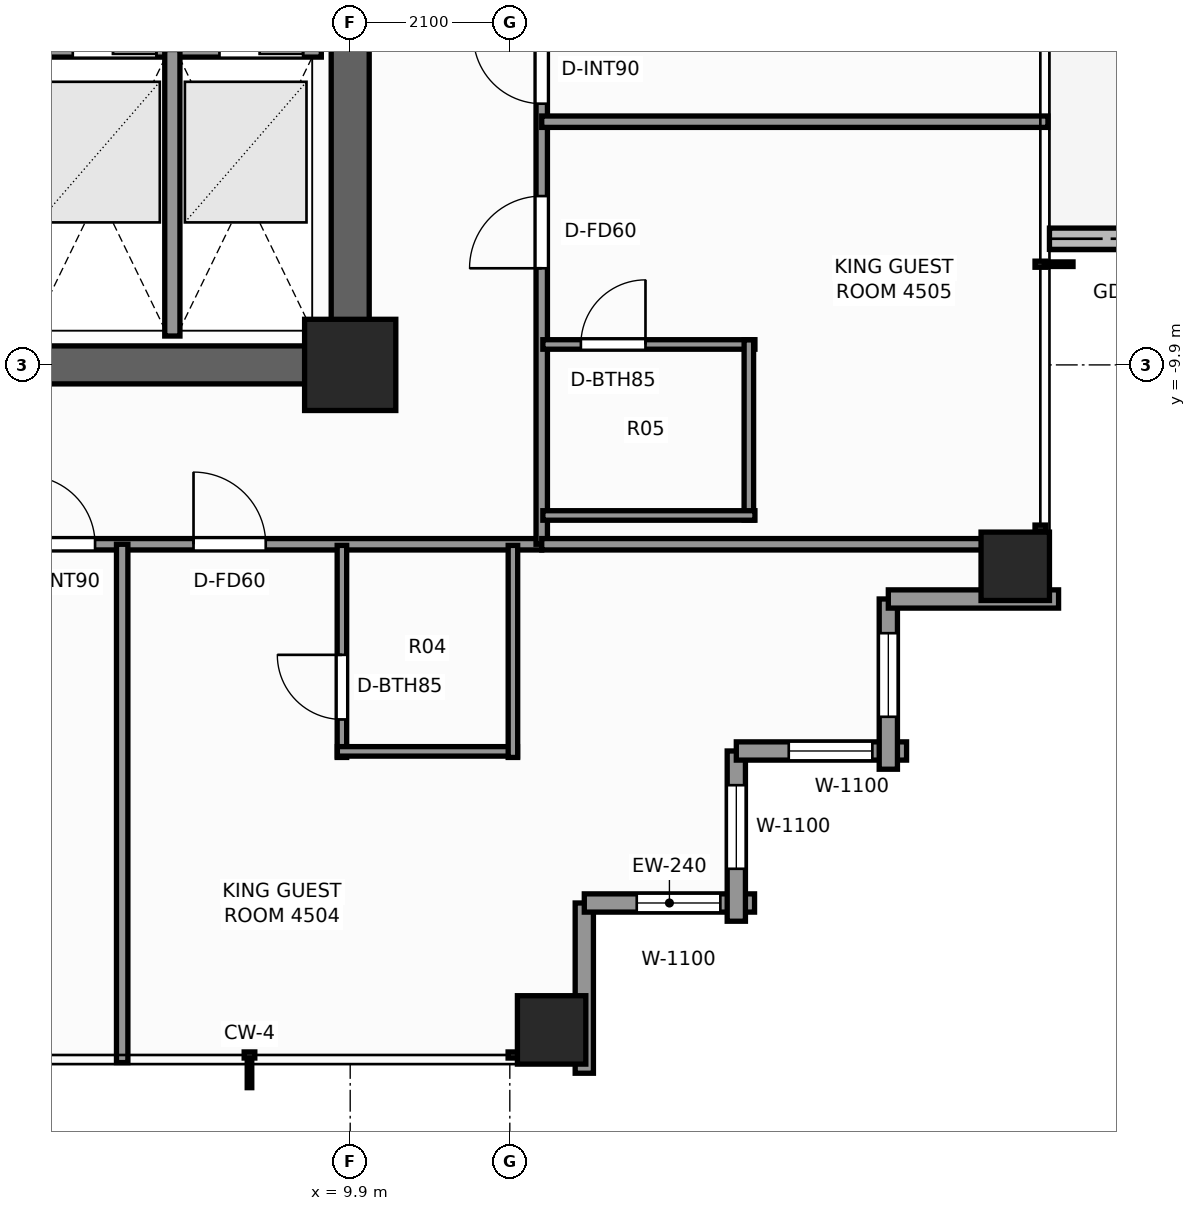
"""IFC4 building model, lengths in metres.
Left out: names, types, materials, properties, quantities, classifications, styles, units other than length and angle.
Written with IfcOpenShell. Run it as: python <this file> out.ifc"""

import sys

from ifc_helpers import new_model, si_unit, direction, frame, frame_2d, origin, origin_2d, place, context, subcontext, project, spatial, rectangle, extrude, element, fill, save


model = new_model("IFC4")
c1 = context("Model", 3, precision=1e-05, world=origin(), true_north=direction((0.0, 1.0)))
c2 = subcontext(c1, "Body", "Model", "MODEL_VIEW")
j1 = project(units=[si_unit("LENGTHUNIT", "METRE"), si_unit("PLANEANGLEUNIT", "RADIAN")], contexts=[c1])
p1 = place(None, origin())
s1 = spatial("IfcSite", under=j1, at=p1, CompositionType="ELEMENT")
p2 = place(p1, origin())
s2 = spatial("IfcBuilding", under=s1, at=p2, CompositionType="ELEMENT")
p3 = place(p2, frame((0.0, 0.0, 156.9)))
s3 = spatial("IfcBuildingStorey", under=s2, at=p3, CompositionType="ELEMENT", Elevation=156.9)
p4 = place(p3, frame((10.15, -9.9, 0.0), z_axis=(0.0, 0.0, 1.0), x_axis=(-1.0, 0.0, 0.0)))
e1 = element("IfcWall", 1, at=p4, inside=s3, PredefinedType="SHEAR", context=c2, shape_type="SweptSolid", body=[
    extrude(rectangle(XDim=12.01, YDim=0.5, at=frame_2d((6.005, 0.0))), origin(), (0.0, 0.0, 1.0), 3.3),
])
p5 = place(p3, frame((9.9, -9.65, 0.0), z_axis=(0.0, 0.0, 1.0), x_axis=(0.0, 1.0, 0.0)))
e2 = element("IfcWall", 2, at=p5, inside=s3, PredefinedType="SHEAR", context=c2, shape_type="SweptSolid", body=[
    extrude(rectangle(XDim=4.1, YDim=0.5, at=frame_2d((2.05, 0.0))), origin(), (0.0, 0.0, 1.0), 3.3),
])
p6 = place(p3, frame((9.9, -9.9, 0.0), z_axis=(0.0, 0.0, 1.0), x_axis=(1.0, 0.0, 0.0)))
e3 = element("IfcColumn", 3, at=p6, inside=s3, PredefinedType="COLUMN", context=c2, shape_type="SweptSolid", body=[
    extrude(rectangle(XDim=1.2, YDim=1.2, at=origin_2d()), origin(), (0.0, 0.0, 1.0), 3.3),
])
for number, where, z_axis, x_axis in (
    (4, (12.55, -18.65, 0.0), (0.0, 0.0, 1.0), (1.0, 0.0, 0.0)),
    (5, (18.65, -12.55, 0.0), (0.0, 0.0, 1.0), (1.0, 0.0, 0.0)),
):
    element("IfcColumn", number, at=place(p3, frame(where, z_axis=z_axis, x_axis=x_axis)), inside=s3, PredefinedType="COLUMN", context=c2, shape_type="SweptSolid", body=[
        extrude(rectangle(XDim=0.9, YDim=0.9, at=origin_2d()), origin(), (0.0, 0.0, 1.0), 3.3),
    ])
p7 = place(p3, frame((19.1, -8.24, -0.02), z_axis=(0.0, 0.0, 1.0), x_axis=(1.0, 0.0, 0.0)))
e6 = element("IfcWall", 6, at=p7, inside=s3, PredefinedType="PARAPET", context=c2, shape_type="SweptSolid", body=[
    extrude(rectangle(XDim=2.34, YDim=0.28, at=frame_2d((1.17, 0.0))), origin(), (0.0, 0.0, 1.0), 0.42),
])
p8 = place(p3, frame((12.98, -16.98, 0.0), z_axis=(0.0, 0.0, 1.0), x_axis=(0.0, -1.0, 0.0)))
e7 = element("IfcWall", 7, at=p8, inside=s3, PredefinedType="STANDARD", context=c2, shape_type="SweptSolid", body=[
    extrude(rectangle(XDim=2.24, YDim=0.24, at=frame_2d((1.12, 0.0))), origin(), (0.0, 0.0, 1.0), 2.483),
])
p9 = place(p3, frame((15.22, -16.98, 0.0), z_axis=(0.0, 0.0, 1.0), x_axis=(-1.0, 0.0, 0.0)))
e8 = element("IfcWall", 8, at=p9, inside=s3, PredefinedType="STANDARD", context=c2, shape_type="SweptSolid", body=[
    extrude(rectangle(XDim=2.24, YDim=0.24, at=frame_2d((1.12, 0.0))), origin(), (0.0, 0.0, 1.0), 2.483),
])
p10 = place(p9, frame((0.45, 0.0, 0.65)))
e9 = element("IfcOpeningElement", 9, at=p10, cuts=e8, PredefinedType="OPENING", context=c2, shape_type="SweptSolid", body=[
    extrude(rectangle(XDim=1.1, YDim=1.45, at=frame_2d((0.55, 0.725))), frame((0.0, 0.13, 0.0), z_axis=(0.0, -1.0, 0.0), x_axis=(1.0, 0.0, 0.0)), (0.0, 0.0, 1.0), 0.26),
])
p11 = place(p3, frame((14.98, -14.98, 0.0), z_axis=(0.0, 0.0, 1.0), x_axis=(0.0, -1.0, 0.0)))
e10 = element("IfcWall", 10, at=p11, inside=s3, PredefinedType="STANDARD", context=c2, shape_type="SweptSolid", body=[
    extrude(rectangle(XDim=2.24, YDim=0.24, at=frame_2d((1.12, 0.0))), origin(), (0.0, 0.0, 1.0), 2.483),
])
p12 = place(p11, frame((0.45, 0.0, 0.65)))
e11 = element("IfcOpeningElement", 11, at=p12, cuts=e10, PredefinedType="OPENING", context=c2, shape_type="SweptSolid", body=[
    extrude(rectangle(XDim=1.1, YDim=1.45, at=frame_2d((0.55, 0.725))), frame((0.0, 0.13, 0.0), z_axis=(0.0, -1.0, 0.0), x_axis=(1.0, 0.0, 0.0)), (0.0, 0.0, 1.0), 0.26),
])
p13 = place(p3, frame((17.22, -14.98, 0.0), z_axis=(0.0, 0.0, 1.0), x_axis=(-1.0, 0.0, 0.0)))
e12 = element("IfcWall", 12, at=p13, inside=s3, PredefinedType="STANDARD", context=c2, shape_type="SweptSolid", body=[
    extrude(rectangle(XDim=2.24, YDim=0.24, at=frame_2d((1.12, 0.0))), origin(), (0.0, 0.0, 1.0), 2.483),
])
p14 = place(p13, frame((0.45, 0.0, 0.65)))
e13 = element("IfcOpeningElement", 13, at=p14, cuts=e12, PredefinedType="OPENING", context=c2, shape_type="SweptSolid", body=[
    extrude(rectangle(XDim=1.1, YDim=1.45, at=frame_2d((0.55, 0.725))), frame((0.0, 0.13, 0.0), z_axis=(0.0, -1.0, 0.0), x_axis=(1.0, 0.0, 0.0)), (0.0, 0.0, 1.0), 0.26),
])
p15 = place(p3, frame((16.98, -12.98, 0.0), z_axis=(0.0, 0.0, 1.0), x_axis=(0.0, -1.0, 0.0)))
e14 = element("IfcWall", 14, at=p15, inside=s3, PredefinedType="STANDARD", context=c2, shape_type="SweptSolid", body=[
    extrude(rectangle(XDim=2.24, YDim=0.24, at=frame_2d((1.12, 0.0))), origin(), (0.0, 0.0, 1.0), 2.483),
])
p16 = place(p15, frame((0.45, 0.0, 0.65)))
e15 = element("IfcOpeningElement", 15, at=p16, cuts=e14, PredefinedType="OPENING", context=c2, shape_type="SweptSolid", body=[
    extrude(rectangle(XDim=1.1, YDim=1.45, at=frame_2d((0.55, 0.725))), frame((0.0, 0.13, 0.0), z_axis=(0.0, -1.0, 0.0), x_axis=(1.0, 0.0, 0.0)), (0.0, 0.0, 1.0), 0.26),
])
p17 = place(p3, frame((19.22, -12.98, 0.0), z_axis=(0.0, 0.0, 1.0), x_axis=(-1.0, 0.0, 0.0)))
e16 = element("IfcWall", 16, at=p17, inside=s3, PredefinedType="STANDARD", context=c2, shape_type="SweptSolid", body=[
    extrude(rectangle(XDim=2.24, YDim=0.24, at=frame_2d((1.12, 0.0))), origin(), (0.0, 0.0, 1.0), 2.483),
])
p18 = place(p3, frame((3.86, -5.75, 0.0), z_axis=(0.0, 0.0, 1.0), x_axis=(1.0, 0.0, 0.0)))
e17 = element("IfcWall", 17, at=p18, inside=s3, PredefinedType="SOLIDWALL", context=c2, shape_type="SweptSolid", body=[
    extrude(rectangle(XDim=5.66, YDim=0.2, at=frame_2d((2.83, 0.0))), origin(), (0.0, 0.0, 1.0), 3.1),
])
p19 = place(p18, frame((0.46, 0.0, 0.0)))
e18 = element("IfcOpeningElement", 18, at=p19, cuts=e17, PredefinedType="OPENING", context=c2, shape_type="SweptSolid", body=[
    extrude(rectangle(XDim=1.1, YDim=2.2, at=frame_2d((0.55, 1.1))), frame((0.0, 0.11, 0.0), z_axis=(0.0, -1.0, 0.0), x_axis=(1.0, 0.0, 0.0)), (0.0, 0.0, 1.0), 0.22),
])
p20 = place(p18, frame((2.39, 0.0, 0.0)))
e19 = element("IfcOpeningElement", 19, at=p20, cuts=e17, PredefinedType="OPENING", context=c2, shape_type="SweptSolid", body=[
    extrude(rectangle(XDim=1.1, YDim=2.2, at=frame_2d((0.55, 1.1))), frame((0.0, 0.11, 0.0), z_axis=(0.0, -1.0, 0.0), x_axis=(1.0, 0.0, 0.0)), (0.0, 0.0, 1.0), 0.22),
])
p21 = place(p18, frame((4.32, 0.0, 0.0)))
e20 = element("IfcOpeningElement", 20, at=p21, cuts=e17, PredefinedType="OPENING", context=c2, shape_type="SweptSolid", body=[
    extrude(rectangle(XDim=1.1, YDim=2.2, at=frame_2d((0.55, 1.1))), frame((0.0, 0.11, 0.0), z_axis=(0.0, -1.0, 0.0), x_axis=(1.0, 0.0, 0.0)), (0.0, 0.0, 1.0), 0.22),
])
p22 = place(p3, frame((7.56, -9.52, 0.0), z_axis=(0.0, 0.0, 1.0), x_axis=(0.0, 1.0, 0.0)))
e21 = element("IfcWall", 21, at=p22, inside=s3, PredefinedType="SOLIDWALL", context=c2, shape_type="SweptSolid", body=[
    extrude(rectangle(XDim=3.77, YDim=0.2, at=frame_2d((1.885, 0.0))), origin(), (0.0, 0.0, 1.0), 3.1),
])
p23 = place(p3, frame((-12.42, -12.26, 0.0), z_axis=(0.0, 0.0, 1.0), x_axis=(1.0, 0.0, 0.0)))
e22 = element("IfcWall", 22, at=p23, inside=s3, PredefinedType="PARTITIONING", context=c2, shape_type="SweptSolid", body=[
    extrude(rectangle(XDim=24.84, YDim=0.15, at=frame_2d((12.42, 0.0))), origin(), (0.0, 0.0, 1.0), 2.389),
])
p24 = place(p23, frame((3.542, 0.0, 0.0)))
e23 = element("IfcOpeningElement", 23, at=p24, cuts=e22, PredefinedType="OPENING", context=c2, shape_type="SweptSolid", body=[
    extrude(rectangle(XDim=0.9, YDim=2.06, at=frame_2d((0.45, 1.03))), frame((0.0, 0.085, 0.0), z_axis=(0.0, -1.0, 0.0), x_axis=(1.0, 0.0, 0.0)), (0.0, 0.0, 1.0), 0.17),
])
p25 = place(p23, frame((5.877, 0.0, 0.0)))
e24 = element("IfcOpeningElement", 24, at=p25, cuts=e22, PredefinedType="OPENING", context=c2, shape_type="SweptSolid", body=[
    extrude(rectangle(XDim=0.9, YDim=2.06, at=frame_2d((0.45, 1.03))), frame((0.0, 0.085, 0.0), z_axis=(0.0, -1.0, 0.0), x_axis=(1.0, 0.0, 0.0)), (0.0, 0.0, 1.0), 0.17),
])
p26 = place(p23, frame((9.693, 0.0, 0.0)))
e25 = element("IfcOpeningElement", 25, at=p26, cuts=e22, PredefinedType="OPENING", context=c2, shape_type="SweptSolid", body=[
    extrude(rectangle(XDim=0.9, YDim=2.06, at=frame_2d((0.45, 1.03))), frame((0.0, 0.085, 0.0), z_axis=(0.0, -1.0, 0.0), x_axis=(1.0, 0.0, 0.0)), (0.0, 0.0, 1.0), 0.17),
])
p27 = place(p23, frame((13.308, 0.0, 0.0)))
e26 = element("IfcOpeningElement", 26, at=p27, cuts=e22, PredefinedType="OPENING", context=c2, shape_type="SweptSolid", body=[
    extrude(rectangle(XDim=0.95, YDim=2.06, at=frame_2d((0.475, 1.03))), frame((0.0, 0.085, 0.0), z_axis=(0.0, -1.0, 0.0), x_axis=(1.0, 0.0, 0.0)), (0.0, 0.0, 1.0), 0.17),
])
p28 = place(p23, frame((18.063, 0.0, 0.0)))
e27 = element("IfcOpeningElement", 27, at=p28, cuts=e22, PredefinedType="OPENING", context=c2, shape_type="SweptSolid", body=[
    extrude(rectangle(XDim=0.9, YDim=2.06, at=frame_2d((0.45, 1.03))), frame((0.0, 0.085, 0.0), z_axis=(0.0, -1.0, 0.0), x_axis=(1.0, 0.0, 0.0)), (0.0, 0.0, 1.0), 0.17),
])
p29 = place(p23, frame((20.259, 0.0, 0.0)))
e28 = element("IfcOpeningElement", 28, at=p29, cuts=e22, PredefinedType="OPENING", context=c2, shape_type="SweptSolid", body=[
    extrude(rectangle(XDim=0.95, YDim=2.06, at=frame_2d((0.475, 1.03))), frame((0.0, 0.085, 0.0), z_axis=(0.0, -1.0, 0.0), x_axis=(1.0, 0.0, 0.0)), (0.0, 0.0, 1.0), 0.17),
])
p30 = place(p3, frame((12.42, -12.26, 0.0), z_axis=(0.0, 0.0, 1.0), x_axis=(0.0, 1.0, 0.0)))
e29 = element("IfcWall", 29, at=p30, inside=s3, PredefinedType="PARTITIONING", context=c2, shape_type="SweptSolid", body=[
    extrude(rectangle(XDim=24.84, YDim=0.15, at=frame_2d((12.42, 0.0))), origin(), (0.0, 0.0, 1.0), 2.389),
])
p31 = place(p30, frame((3.631, 0.0, 0.0)))
e30 = element("IfcOpeningElement", 30, at=p31, cuts=e29, PredefinedType="OPENING", context=c2, shape_type="SweptSolid", body=[
    extrude(rectangle(XDim=0.95, YDim=2.06, at=frame_2d((0.475, 1.03))), frame((0.0, 0.085, 0.0), z_axis=(0.0, -1.0, 0.0), x_axis=(1.0, 0.0, 0.0)), (0.0, 0.0, 1.0), 0.17),
])
p32 = place(p30, frame((5.797, 0.0, 0.0)))
e31 = element("IfcOpeningElement", 31, at=p32, cuts=e29, PredefinedType="OPENING", context=c2, shape_type="SweptSolid", body=[
    extrude(rectangle(XDim=0.9, YDim=2.06, at=frame_2d((0.45, 1.03))), frame((0.0, 0.085, 0.0), z_axis=(0.0, -1.0, 0.0), x_axis=(1.0, 0.0, 0.0)), (0.0, 0.0, 1.0), 0.17),
])
p33 = place(p30, frame((12.801, 0.0, 0.0)))
e32 = element("IfcOpeningElement", 32, at=p33, cuts=e29, PredefinedType="OPENING", context=c2, shape_type="SweptSolid", body=[
    extrude(rectangle(XDim=0.95, YDim=2.06, at=frame_2d((0.475, 1.03))), frame((0.0, 0.085, 0.0), z_axis=(0.0, -1.0, 0.0), x_axis=(1.0, 0.0, 0.0)), (0.0, 0.0, 1.0), 0.17),
])
p34 = place(p30, frame((18.217, 0.0, 0.0)))
e33 = element("IfcOpeningElement", 33, at=p34, cuts=e29, PredefinedType="OPENING", context=c2, shape_type="SweptSolid", body=[
    extrude(rectangle(XDim=0.95, YDim=2.06, at=frame_2d((0.475, 1.03))), frame((0.0, 0.085, 0.0), z_axis=(0.0, -1.0, 0.0), x_axis=(1.0, 0.0, 0.0)), (0.0, 0.0, 1.0), 0.17),
])
p35 = place(p30, frame((20.517, 0.0, 0.0)))
e34 = element("IfcOpeningElement", 34, at=p35, cuts=e29, PredefinedType="OPENING", context=c2, shape_type="SweptSolid", body=[
    extrude(rectangle(XDim=0.95, YDim=2.06, at=frame_2d((0.475, 1.03))), frame((0.0, 0.085, 0.0), z_axis=(0.0, -1.0, 0.0), x_axis=(1.0, 0.0, 0.0)), (0.0, 0.0, 1.0), 0.17),
])
p36 = place(p3, frame((12.42, -12.26, 0.0), z_axis=(0.0, 0.0, 1.0), x_axis=(1.0, 0.0, 0.0)))
e35 = element("IfcWall", 35, at=p36, inside=s3, PredefinedType="PARTITIONING", context=c2, shape_type="SweptSolid", body=[
    extrude(rectangle(XDim=6.66, YDim=0.15, at=frame_2d((3.33, 0.0))), origin(), (0.0, 0.0, 1.0), 2.389),
])
p37 = place(p3, frame((6.9, -19.08, 0.0), z_axis=(0.0, 0.0, 1.0), x_axis=(0.0, 1.0, 0.0)))
e36 = element("IfcWall", 36, at=p37, inside=s3, PredefinedType="PARTITIONING", context=c2, shape_type="SweptSolid", body=[
    extrude(rectangle(XDim=6.82, YDim=0.15, at=frame_2d((3.41, 0.0))), origin(), (0.0, 0.0, 1.0), 2.473),
])
p38 = place(p3, frame((9.791, -15.065, 0.0), z_axis=(0.0, 0.0, 1.0), x_axis=(0.0, 1.0, 0.0)))
e37 = element("IfcWall", 37, at=p38, inside=s3, PredefinedType="PARTITIONING", context=c2, shape_type="SweptSolid", body=[
    extrude(rectangle(XDim=2.79, YDim=0.125, at=frame_2d((1.395, 0.0))), origin(), (0.0, 0.0, 1.0), 3.1),
])
p39 = place(p38, frame((0.5, 0.0, 0.0)))
e38 = element("IfcOpeningElement", 38, at=p39, cuts=e37, PredefinedType="OPENING", context=c2, shape_type="SweptSolid", body=[
    extrude(rectangle(XDim=0.85, YDim=2.03, at=frame_2d((0.425, 1.015))), frame((0.0, 0.073, 0.0), z_axis=(0.0, -1.0, 0.0), x_axis=(1.0, 0.0, 0.0)), (0.0, 0.0, 1.0), 0.145),
])
p40 = place(p3, frame((9.731, -14.985, 0.0), z_axis=(0.0, 0.0, 1.0), x_axis=(1.0, 0.0, 0.0)))
e39 = element("IfcWall", 39, at=p40, inside=s3, PredefinedType="PARTITIONING", context=c2, shape_type="SweptSolid", body=[
    extrude(rectangle(XDim=2.37, YDim=0.125, at=frame_2d((1.185, 0.0))), origin(), (0.0, 0.0, 1.0), 2.389),
])
p41 = place(p3, frame((12.041, -15.065, 0.0), z_axis=(0.0, 0.0, 1.0), x_axis=(0.0, 1.0, 0.0)))
e40 = element("IfcWall", 40, at=p41, inside=s3, PredefinedType="PARTITIONING", context=c2, shape_type="SweptSolid", body=[
    extrude(rectangle(XDim=2.79, YDim=0.125, at=frame_2d((1.395, 0.0))), origin(), (0.0, 0.0, 1.0), 3.1),
])
p42 = place(p3, frame((12.42, -6.7, 0.0), z_axis=(0.0, 0.0, 1.0), x_axis=(1.0, 0.0, 0.0)))
e41 = element("IfcWall", 41, at=p42, inside=s3, PredefinedType="PARTITIONING", context=c2, shape_type="SweptSolid", body=[
    extrude(rectangle(XDim=6.66, YDim=0.15, at=frame_2d((3.33, 0.0))), origin(), (0.0, 0.0, 1.0), 2.473),
])
p43 = place(p3, frame((12.435, -9.631, 0.0), z_axis=(0.0, 0.0, 1.0), x_axis=(1.0, 0.0, 0.0)))
e42 = element("IfcWall", 42, at=p43, inside=s3, PredefinedType="PARTITIONING", context=c2, shape_type="SweptSolid", body=[
    extrude(rectangle(XDim=2.79, YDim=0.125, at=frame_2d((1.395, 0.0))), origin(), (0.0, 0.0, 1.0), 3.1),
])
p44 = place(p43, frame((0.5, 0.0, 0.0)))
e43 = element("IfcOpeningElement", 43, at=p44, cuts=e42, PredefinedType="OPENING", context=c2, shape_type="SweptSolid", body=[
    extrude(rectangle(XDim=0.85, YDim=2.03, at=frame_2d((0.425, 1.015))), frame((0.0, 0.073, 0.0), z_axis=(0.0, -1.0, 0.0), x_axis=(1.0, 0.0, 0.0)), (0.0, 0.0, 1.0), 0.145),
])
p45 = place(p3, frame((15.145, -11.941, 0.0), z_axis=(0.0, 0.0, 1.0), x_axis=(0.0, 1.0, 0.0)))
e44 = element("IfcWall", 44, at=p45, inside=s3, PredefinedType="PARTITIONING", context=c2, shape_type="SweptSolid", body=[
    extrude(rectangle(XDim=2.37, YDim=0.125, at=frame_2d((1.185, 0.0))), origin(), (0.0, 0.0, 1.0), 2.389),
])
p46 = place(p3, frame((12.435, -11.881, 0.0), z_axis=(0.0, 0.0, 1.0), x_axis=(1.0, 0.0, 0.0)))
e45 = element("IfcWall", 45, at=p46, inside=s3, PredefinedType="PARTITIONING", context=c2, shape_type="SweptSolid", body=[
    extrude(rectangle(XDim=2.79, YDim=0.125, at=frame_2d((1.395, 0.0))), origin(), (0.0, 0.0, 1.0), 3.1),
])
p47 = place(p10, origin())
e46 = element("IfcWindow", 46, at=p47, inside=s3, PartitioningType="SINGLE_PANEL", PredefinedType="WINDOW", context=c2, shape_type="SweptSolid", body=[
    extrude(rectangle(XDim=1.1, YDim=1.45, at=frame_2d((0.55, 0.725))), frame((0.0, 0.03, 0.0), z_axis=(0.0, -1.0, 0.0), x_axis=(1.0, 0.0, 0.0)), (0.0, 0.0, 1.0), 0.06),
])
fill(e9, e46)
p48 = place(p12, origin())
e47 = element("IfcWindow", 47, at=p48, inside=s3, PartitioningType="SINGLE_PANEL", PredefinedType="WINDOW", context=c2, shape_type="SweptSolid", body=[
    extrude(rectangle(XDim=1.1, YDim=1.45, at=frame_2d((0.55, 0.725))), frame((0.0, 0.03, 0.0), z_axis=(0.0, -1.0, 0.0), x_axis=(1.0, 0.0, 0.0)), (0.0, 0.0, 1.0), 0.06),
])
fill(e11, e47)
p49 = place(p14, origin())
e48 = element("IfcWindow", 48, at=p49, inside=s3, PartitioningType="SINGLE_PANEL", PredefinedType="WINDOW", context=c2, shape_type="SweptSolid", body=[
    extrude(rectangle(XDim=1.1, YDim=1.45, at=frame_2d((0.55, 0.725))), frame((0.0, 0.03, 0.0), z_axis=(0.0, -1.0, 0.0), x_axis=(1.0, 0.0, 0.0)), (0.0, 0.0, 1.0), 0.06),
])
fill(e13, e48)
p50 = place(p16, origin())
e49 = element("IfcWindow", 49, at=p50, inside=s3, PartitioningType="SINGLE_PANEL", PredefinedType="WINDOW", context=c2, shape_type="SweptSolid", body=[
    extrude(rectangle(XDim=1.1, YDim=1.45, at=frame_2d((0.55, 0.725))), frame((0.0, 0.03, 0.0), z_axis=(0.0, -1.0, 0.0), x_axis=(1.0, 0.0, 0.0)), (0.0, 0.0, 1.0), 0.06),
])
fill(e15, e49)
p51 = place(p28, origin())
e50 = element("IfcDoor", 50, at=p51, inside=s3, OperationType="SINGLE_SWING_LEFT", PredefinedType="DOOR", context=c2, shape_type="SweptSolid", body=[
    extrude(rectangle(XDim=0.9, YDim=2.06, at=frame_2d((0.45, 1.03))), frame((0.0, 0.025, 0.0), z_axis=(0.0, -1.0, 0.0), x_axis=(1.0, 0.0, 0.0)), (0.0, 0.0, 1.0), 0.05),
])
fill(e27, e50)
p52 = place(p39, origin())
e51 = element("IfcDoor", 51, at=p52, inside=s3, OperationType="SINGLE_SWING_RIGHT", PredefinedType="DOOR", context=c2, shape_type="SweptSolid", body=[
    extrude(rectangle(XDim=0.85, YDim=2.03, at=frame_2d((0.425, 1.015))), frame((0.0, 0.025, 0.0), z_axis=(0.0, -1.0, 0.0), x_axis=(1.0, 0.0, 0.0)), (0.0, 0.0, 1.0), 0.05),
])
fill(e38, e51)
p53 = place(p29, origin())
e52 = element("IfcDoor", 52, at=p53, inside=s3, OperationType="SINGLE_SWING_LEFT", PredefinedType="DOOR", context=c2, shape_type="SweptSolid", body=[
    extrude(rectangle(XDim=0.95, YDim=2.06, at=frame_2d((0.475, 1.03))), frame((0.0, 0.025, 0.0), z_axis=(0.0, -1.0, 0.0), x_axis=(1.0, 0.0, 0.0)), (0.0, 0.0, 1.0), 0.05),
])
fill(e28, e52)
p54 = place(p44, origin())
e53 = element("IfcDoor", 53, at=p54, inside=s3, OperationType="SINGLE_SWING_RIGHT", PredefinedType="DOOR", context=c2, shape_type="SweptSolid", body=[
    extrude(rectangle(XDim=0.85, YDim=2.03, at=frame_2d((0.425, 1.015))), frame((0.0, 0.025, 0.0), z_axis=(0.0, -1.0, 0.0), x_axis=(1.0, 0.0, 0.0)), (0.0, 0.0, 1.0), 0.05),
])
fill(e43, e53)
p55 = place(p31, origin())
e54 = element("IfcDoor", 54, at=p55, inside=s3, OperationType="SINGLE_SWING_LEFT", PredefinedType="DOOR", context=c2, shape_type="SweptSolid", body=[
    extrude(rectangle(XDim=0.95, YDim=2.06, at=frame_2d((0.475, 1.03))), frame((0.0, 0.025, 0.0), z_axis=(0.0, -1.0, 0.0), x_axis=(1.0, 0.0, 0.0)), (0.0, 0.0, 1.0), 0.05),
])
fill(e30, e54)
p56 = place(p32, origin())
e55 = element("IfcDoor", 55, at=p56, inside=s3, OperationType="SINGLE_SWING_RIGHT", PredefinedType="DOOR", context=c2, shape_type="SweptSolid", body=[
    extrude(rectangle(XDim=0.9, YDim=2.06, at=frame_2d((0.45, 1.03))), frame((0.0, 0.025, 0.0), z_axis=(0.0, -1.0, 0.0), x_axis=(1.0, 0.0, 0.0)), (0.0, 0.0, 1.0), 0.05),
])
fill(e31, e55)
save(model, sys.argv[1])
